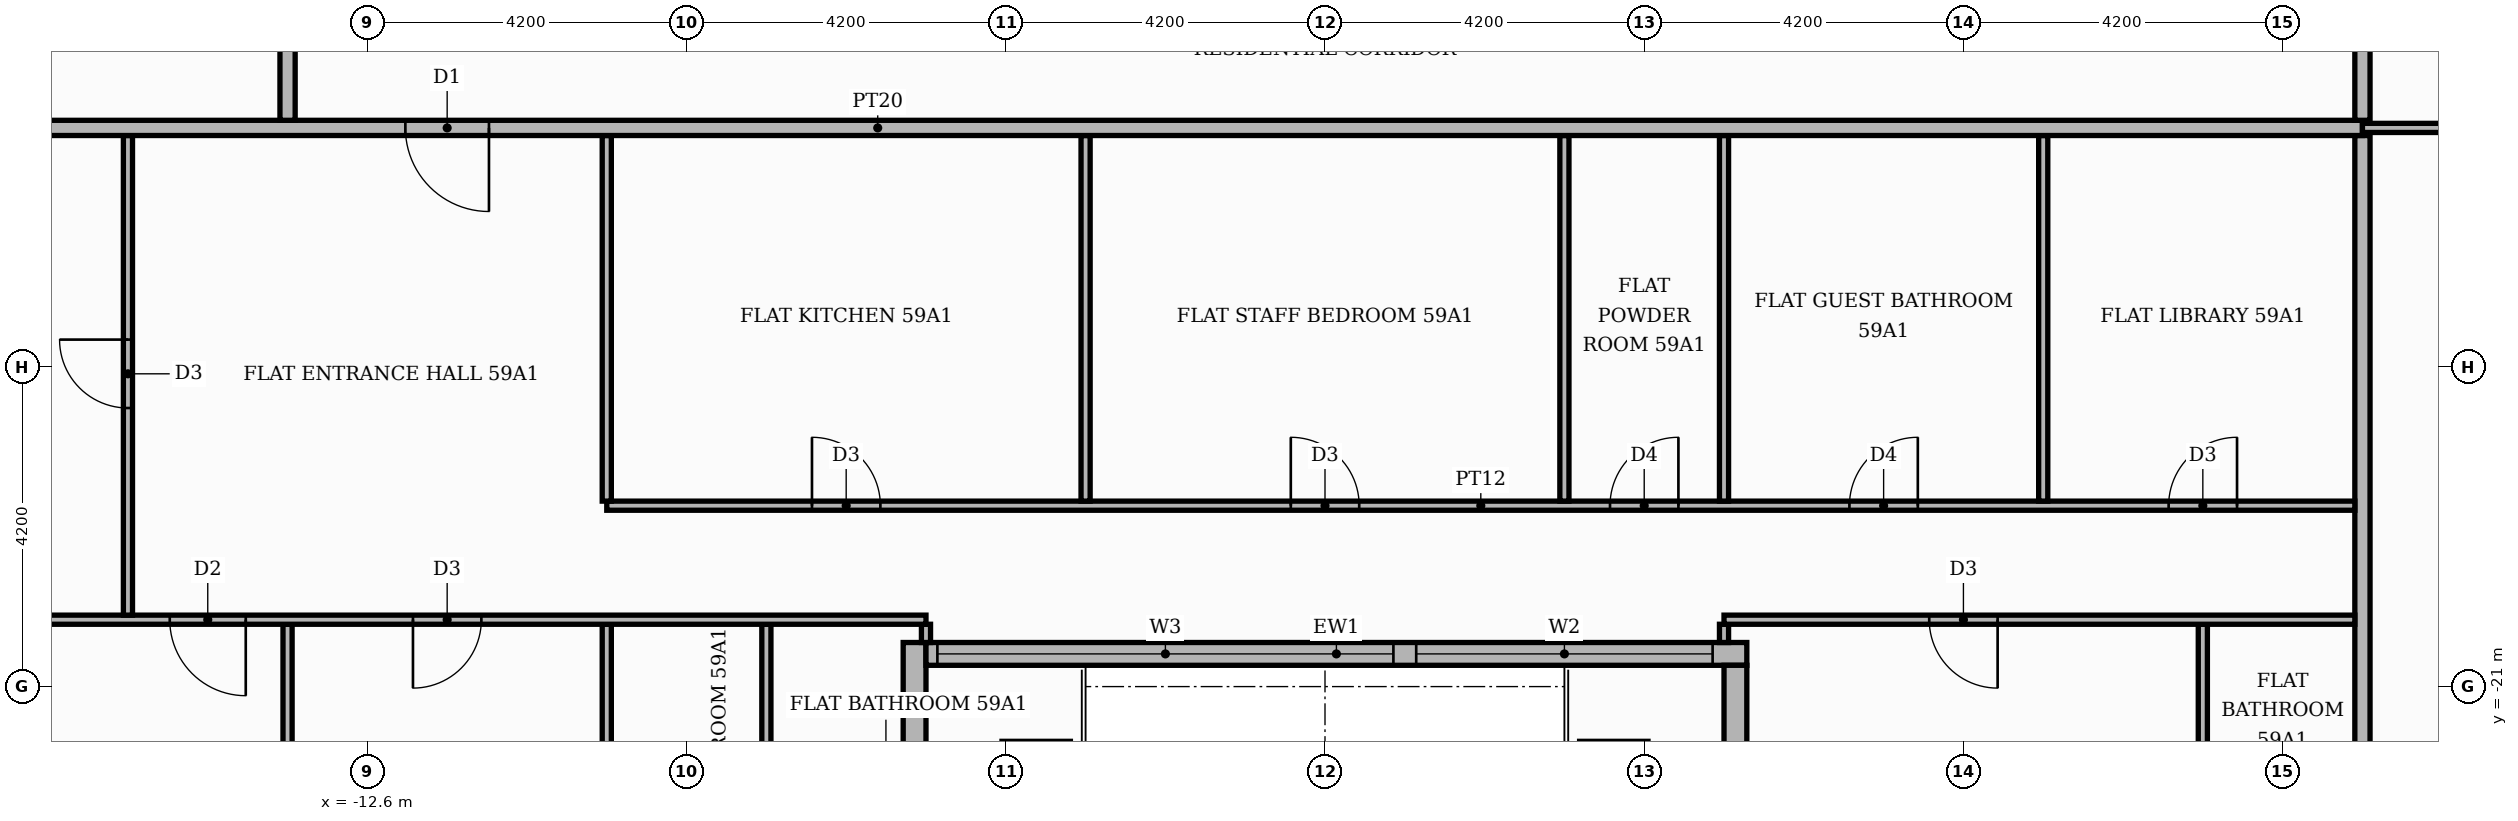
"""IFC4 building model, lengths in metres.
Left out: names, types, materials, properties, quantities, classifications, styles, units other than length and angle.
Written with IfcOpenShell. Run it as: python <this file> out.ifc"""

import sys

from ifc_helpers import new_model, si_unit, direction, frame, frame_2d, origin, place, context, subcontext, project, spatial, rectangle, extrude, element, fill, save


model = new_model("IFC4")
c1 = context("Model", 3, precision=1e-05, world=origin(), true_north=direction((0.0, 1.0)))
c2 = subcontext(c1, "Body", "Model", "MODEL_VIEW")
j1 = project(units=[si_unit("LENGTHUNIT", "METRE"), si_unit("PLANEANGLEUNIT", "RADIAN")], contexts=[c1])
p1 = place(None, origin())
s1 = spatial("IfcSite", under=j1, at=p1, CompositionType="ELEMENT")
p2 = place(p1, origin())
s2 = spatial("IfcBuilding", under=s1, at=p2, CompositionType="ELEMENT")
p3 = place(p2, frame((0.0, 0.0, 248.4)))
s3 = spatial("IfcBuildingStorey", under=s2, at=p3, CompositionType="ELEMENT", Elevation=248.4)
p4 = place(p3, frame((-5.4, -25.42, 0.0), z_axis=(0.0, 0.0, 1.0), x_axis=(0.0, 1.0, 0.0)))
e1 = element("IfcWall", 1, at=p4, inside=s3, PredefinedType="STANDARD", context=c2, shape_type="SweptSolid", body=[
    extrude(rectangle(XDim=5.0, YDim=0.3, at=frame_2d((2.5, 0.0))), origin(), (0.0, 0.0, 1.0), 3.48),
])
p5 = place(p4, frame((1.42, 0.0, 0.0)))
e2 = element("IfcOpeningElement", 2, at=p5, cuts=e1, PredefinedType="OPENING", context=c2, shape_type="SweptSolid", body=[
    extrude(rectangle(XDim=1.8, YDim=2.4, at=frame_2d((0.9, 1.2))), frame((0.0, 0.16, 0.0), z_axis=(0.0, -1.0, 0.0), x_axis=(1.0, 0.0, 0.0)), (0.0, 0.0, 1.0), 0.32),
])
p6 = place(p3, frame((-5.25, -20.57, 0.0), z_axis=(0.0, 0.0, 1.0), x_axis=(1.0, 0.0, 0.0)))
e3 = element("IfcWall", 3, at=p6, inside=s3, PredefinedType="STANDARD", context=c2, shape_type="SweptSolid", body=[
    extrude(rectangle(XDim=10.8, YDim=0.3, at=frame_2d((5.4, 0.0))), origin(), (0.0, 0.0, 1.0), 3.48),
])
p7 = place(p6, frame((0.15, 0.0, 0.9)))
e4 = element("IfcOpeningElement", 4, at=p7, cuts=e3, PredefinedType="OPENING", context=c2, shape_type="SweptSolid", body=[
    extrude(rectangle(XDim=6.0, YDim=2.1, at=frame_2d((3.0, 1.05))), frame((0.0, 0.16, 0.0), z_axis=(0.0, -1.0, 0.0), x_axis=(1.0, 0.0, 0.0)), (0.0, 0.0, 1.0), 0.32),
])
p8 = place(p6, frame((6.45, 0.0, 0.9)))
e5 = element("IfcOpeningElement", 5, at=p8, cuts=e3, PredefinedType="OPENING", context=c2, shape_type="SweptSolid", body=[
    extrude(rectangle(XDim=3.9, YDim=2.1, at=frame_2d((1.95, 1.05))), frame((0.0, 0.16, 0.0), z_axis=(0.0, -1.0, 0.0), x_axis=(1.0, 0.0, 0.0)), (0.0, 0.0, 1.0), 0.32),
])
p9 = place(p3, frame((5.4, -20.72, 0.0), z_axis=(0.0, 0.0, 1.0), x_axis=(0.0, -1.0, 0.0)))
e6 = element("IfcWall", 6, at=p9, inside=s3, PredefinedType="STANDARD", context=c2, shape_type="SweptSolid", body=[
    extrude(rectangle(XDim=5.0, YDim=0.3, at=frame_2d((2.5, 0.0))), origin(), (0.0, 0.0, 1.0), 3.48),
])
p10 = place(p9, frame((1.48, 0.0, 0.0)))
e7 = element("IfcOpeningElement", 7, at=p10, cuts=e6, PredefinedType="OPENING", context=c2, shape_type="SweptSolid", body=[
    extrude(rectangle(XDim=1.8, YDim=2.4, at=frame_2d((0.9, 1.2))), frame((0.0, 0.16, 0.0), z_axis=(0.0, -1.0, 0.0), x_axis=(1.0, 0.0, 0.0)), (0.0, 0.0, 1.0), 0.32),
])
p11 = place(p3, frame((-13.65, -25.42, 0.0), z_axis=(0.0, 0.0, 1.0), x_axis=(0.0, 1.0, 0.0)))
e8 = element("IfcWall", 8, at=p11, inside=s3, PredefinedType="PARTITIONING", context=c2, shape_type="SweptSolid", body=[
    extrude(rectangle(XDim=5.24, YDim=0.12, at=frame_2d((2.62, 0.0))), origin(), (0.0, 0.0, 1.0), 3.48),
])
p12 = place(p3, frame((-9.45, -25.42, 0.0), z_axis=(0.0, 0.0, 1.0), x_axis=(0.0, 1.0, 0.0)))
e9 = element("IfcWall", 9, at=p12, inside=s3, PredefinedType="PARTITIONING", context=c2, shape_type="SweptSolid", body=[
    extrude(rectangle(XDim=5.24, YDim=0.12, at=frame_2d((2.62, 0.0))), origin(), (0.0, 0.0, 1.0), 3.48),
])
p13 = place(p12, frame((2.05, 0.0, 0.0)))
e10 = element("IfcOpeningElement", 10, at=p13, cuts=e9, PredefinedType="OPENING", context=c2, shape_type="SweptSolid", body=[
    extrude(rectangle(XDim=0.9, YDim=2.1, at=frame_2d((0.45, 1.05))), frame((0.0, 0.07, 0.0), z_axis=(0.0, -1.0, 0.0), x_axis=(1.0, 0.0, 0.0)), (0.0, 0.0, 1.0), 0.14),
])
p14 = place(p3, frame((-7.35, -25.42, 0.0), z_axis=(0.0, 0.0, 1.0), x_axis=(0.0, 1.0, 0.0)))
e11 = element("IfcWall", 11, at=p14, inside=s3, PredefinedType="PARTITIONING", context=c2, shape_type="SweptSolid", body=[
    extrude(rectangle(XDim=5.24, YDim=0.12, at=frame_2d((2.62, 0.0))), origin(), (0.0, 0.0, 1.0), 3.48),
])
p15 = place(p14, frame((2.05, 0.0, 0.0)))
e12 = element("IfcOpeningElement", 12, at=p15, cuts=e11, PredefinedType="OPENING", context=c2, shape_type="SweptSolid", body=[
    extrude(rectangle(XDim=0.9, YDim=2.1, at=frame_2d((0.45, 1.05))), frame((0.0, 0.07, 0.0), z_axis=(0.0, -1.0, 0.0), x_axis=(1.0, 0.0, 0.0)), (0.0, 0.0, 1.0), 0.14),
])
p16 = place(p3, frame((11.55, -25.42, 0.0), z_axis=(0.0, 0.0, 1.0), x_axis=(0.0, 1.0, 0.0)))
e13 = element("IfcWall", 13, at=p16, inside=s3, PredefinedType="PARTITIONING", context=c2, shape_type="SweptSolid", body=[
    extrude(rectangle(XDim=5.24, YDim=0.12, at=frame_2d((2.62, 0.0))), origin(), (0.0, 0.0, 1.0), 3.48),
])
p17 = place(p16, frame((2.05, 0.0, 0.0)))
e14 = element("IfcOpeningElement", 14, at=p17, cuts=e13, PredefinedType="OPENING", context=c2, shape_type="SweptSolid", body=[
    extrude(rectangle(XDim=0.9, YDim=2.1, at=frame_2d((0.45, 1.05))), frame((0.0, 0.07, 0.0), z_axis=(0.0, -1.0, 0.0), x_axis=(1.0, 0.0, 0.0)), (0.0, 0.0, 1.0), 0.14),
])
p18 = place(p3, frame((13.65, -25.42, 0.0), z_axis=(0.0, 0.0, 1.0), x_axis=(0.0, 1.0, 0.0)))
e15 = element("IfcWall", 15, at=p18, inside=s3, PredefinedType="PARTITIONING", context=c2, shape_type="SweptSolid", body=[
    extrude(rectangle(XDim=11.67, YDim=0.2, at=frame_2d((5.835, 0.0))), origin(), (0.0, 0.0, 1.0), 3.48),
])
for number, where, z_axis, x_axis in (
    (16, (-5.25, -20.42, 0.0), (0.0, 0.0, 1.0), (0.0, 1.0, 0.0)),
    (17, (5.25, -20.42, 0.0), (0.0, 0.0, 1.0), (0.0, 1.0, 0.0)),
):
    element("IfcWall", number, at=place(p3, frame(where, z_axis=z_axis, x_axis=x_axis)), inside=s3, PredefinedType="PARTITIONING", context=c2, shape_type="SweptSolid", body=[
        extrude(rectangle(XDim=0.24, YDim=0.12, at=frame_2d((0.12, 0.0))), origin(), (0.0, 0.0, 1.0), 3.48),
    ])
p19 = place(p3, frame((-20.719, -20.12, 0.0), z_axis=(0.0, 0.0, 1.0), x_axis=(1.0, 0.0, 0.0)))
e18 = element("IfcWall", 18, at=p19, inside=s3, PredefinedType="PARTITIONING", context=c2, shape_type="SweptSolid", body=[
    extrude(rectangle(XDim=15.469, YDim=0.12, at=frame_2d((7.734, 0.0))), origin(), (0.0, 0.0, 1.0), 3.48),
])
p20 = place(p19, frame((5.519, 0.0, 0.0)))
e19 = element("IfcOpeningElement", 19, at=p20, cuts=e18, PredefinedType="OPENING", context=c2, shape_type="SweptSolid", body=[
    extrude(rectangle(XDim=1.0, YDim=2.1, at=frame_2d((0.5, 1.05))), frame((0.0, 0.07, 0.0), z_axis=(0.0, -1.0, 0.0), x_axis=(1.0, 0.0, 0.0)), (0.0, 0.0, 1.0), 0.14),
])
p21 = place(p19, frame((8.719, 0.0, 0.0)))
e20 = element("IfcOpeningElement", 20, at=p21, cuts=e18, PredefinedType="OPENING", context=c2, shape_type="SweptSolid", body=[
    extrude(rectangle(XDim=0.9, YDim=2.1, at=frame_2d((0.45, 1.05))), frame((0.0, 0.07, 0.0), z_axis=(0.0, -1.0, 0.0), x_axis=(1.0, 0.0, 0.0)), (0.0, 0.0, 1.0), 0.14),
])
p22 = place(p3, frame((5.25, -20.12, 0.0), z_axis=(0.0, 0.0, 1.0), x_axis=(1.0, 0.0, 0.0)))
e21 = element("IfcWall", 21, at=p22, inside=s3, PredefinedType="PARTITIONING", context=c2, shape_type="SweptSolid", body=[
    extrude(rectangle(XDim=8.3, YDim=0.12, at=frame_2d((4.15, 0.0))), origin(), (0.0, 0.0, 1.0), 3.48),
])
p23 = place(p22, frame((2.7, 0.0, 0.0)))
e22 = element("IfcOpeningElement", 22, at=p23, cuts=e21, PredefinedType="OPENING", context=c2, shape_type="SweptSolid", body=[
    extrude(rectangle(XDim=0.9, YDim=2.1, at=frame_2d((0.45, 1.05))), frame((0.0, 0.07, 0.0), z_axis=(0.0, -1.0, 0.0), x_axis=(1.0, 0.0, 0.0)), (0.0, 0.0, 1.0), 0.14),
])
p24 = place(p3, frame((-15.75, -20.06, 0.0), z_axis=(0.0, 0.0, 1.0), x_axis=(0.0, 1.0, 0.0)))
e23 = element("IfcWall", 23, at=p24, inside=s3, PredefinedType="PARTITIONING", context=c2, shape_type="SweptSolid", body=[
    extrude(rectangle(XDim=6.31, YDim=0.12, at=frame_2d((3.155, 0.0))), origin(), (0.0, 0.0, 1.0), 3.48),
])
p25 = place(p24, frame((2.725, 0.0, 0.0)))
e24 = element("IfcOpeningElement", 24, at=p25, cuts=e23, PredefinedType="OPENING", context=c2, shape_type="SweptSolid", body=[
    extrude(rectangle(XDim=0.9, YDim=2.1, at=frame_2d((0.45, 1.05))), frame((0.0, 0.07, 0.0), z_axis=(0.0, -1.0, 0.0), x_axis=(1.0, 0.0, 0.0)), (0.0, 0.0, 1.0), 0.14),
])
p26 = place(p3, frame((-9.45, -18.62, 0.0), z_axis=(0.0, 0.0, 1.0), x_axis=(1.0, 0.0, 0.0)))
e25 = element("IfcWall", 25, at=p26, inside=s3, PredefinedType="PARTITIONING", context=c2, shape_type="SweptSolid", body=[
    extrude(rectangle(XDim=23.0, YDim=0.12, at=frame_2d((11.5, 0.0))), origin(), (0.0, 0.0, 1.0), 3.48),
])
p27 = place(p26, frame((2.7, 0.0, 0.0)))
e26 = element("IfcOpeningElement", 26, at=p27, cuts=e25, PredefinedType="OPENING", context=c2, shape_type="SweptSolid", body=[
    extrude(rectangle(XDim=0.9, YDim=2.1, at=frame_2d((0.45, 1.05))), frame((0.0, 0.07, 0.0), z_axis=(0.0, -1.0, 0.0), x_axis=(1.0, 0.0, 0.0)), (0.0, 0.0, 1.0), 0.14),
])
p28 = place(p26, frame((9.0, 0.0, 0.0)))
e27 = element("IfcOpeningElement", 27, at=p28, cuts=e25, PredefinedType="OPENING", context=c2, shape_type="SweptSolid", body=[
    extrude(rectangle(XDim=0.9, YDim=2.1, at=frame_2d((0.45, 1.05))), frame((0.0, 0.07, 0.0), z_axis=(0.0, -1.0, 0.0), x_axis=(1.0, 0.0, 0.0)), (0.0, 0.0, 1.0), 0.14),
])
p29 = place(p26, frame((13.2, 0.0, 0.0)))
e28 = element("IfcOpeningElement", 28, at=p29, cuts=e25, PredefinedType="OPENING", context=c2, shape_type="SweptSolid", body=[
    extrude(rectangle(XDim=0.9, YDim=2.1, at=frame_2d((0.45, 1.05))), frame((0.0, 0.07, 0.0), z_axis=(0.0, -1.0, 0.0), x_axis=(1.0, 0.0, 0.0)), (0.0, 0.0, 1.0), 0.14),
])
p30 = place(p26, frame((16.35, 0.0, 0.0)))
e29 = element("IfcOpeningElement", 29, at=p30, cuts=e25, PredefinedType="OPENING", context=c2, shape_type="SweptSolid", body=[
    extrude(rectangle(XDim=0.9, YDim=2.1, at=frame_2d((0.45, 1.05))), frame((0.0, 0.07, 0.0), z_axis=(0.0, -1.0, 0.0), x_axis=(1.0, 0.0, 0.0)), (0.0, 0.0, 1.0), 0.14),
])
p31 = place(p26, frame((20.55, 0.0, 0.0)))
e30 = element("IfcOpeningElement", 30, at=p31, cuts=e25, PredefinedType="OPENING", context=c2, shape_type="SweptSolid", body=[
    extrude(rectangle(XDim=0.9, YDim=2.1, at=frame_2d((0.45, 1.05))), frame((0.0, 0.07, 0.0), z_axis=(0.0, -1.0, 0.0), x_axis=(1.0, 0.0, 0.0)), (0.0, 0.0, 1.0), 0.14),
])
for number, where, z_axis, x_axis in (
    (31, (-9.45, -18.56, 0.0), (0.0, 0.0, 1.0), (0.0, 1.0, 0.0)),
    (32, (-3.15, -18.56, 0.0), (0.0, 0.0, 1.0), (0.0, 1.0, 0.0)),
    (33, (3.15, -18.56, 0.0), (0.0, 0.0, 1.0), (0.0, 1.0, 0.0)),
    (34, (5.25, -18.56, 0.0), (0.0, 0.0, 1.0), (0.0, 1.0, 0.0)),
    (35, (9.45, -18.56, 0.0), (0.0, 0.0, 1.0), (0.0, 1.0, 0.0)),
):
    element("IfcWall", number, at=place(p3, frame(where, z_axis=z_axis, x_axis=x_axis)), inside=s3, PredefinedType="PARTITIONING", context=c2, shape_type="SweptSolid", body=[
        extrude(rectangle(XDim=4.81, YDim=0.12, at=frame_2d((2.405, 0.0))), origin(), (0.0, 0.0, 1.0), 3.48),
    ])
p32 = place(p3, frame((-25.42, -13.65, 0.0), z_axis=(0.0, 0.0, 1.0), x_axis=(1.0, 0.0, 0.0)))
e36 = element("IfcWall", 36, at=p32, inside=s3, PredefinedType="PARTITIONING", context=c2, shape_type="SweptSolid", body=[
    extrude(rectangle(XDim=39.07, YDim=0.2, at=frame_2d((19.535, 0.0))), origin(), (0.0, 0.0, 1.0), 3.48),
])
p33 = place(p32, frame((13.32, 0.0, 0.0)))
e37 = element("IfcOpeningElement", 37, at=p33, cuts=e36, PredefinedType="OPENING", context=c2, shape_type="SweptSolid", body=[
    extrude(rectangle(XDim=1.1, YDim=2.4, at=frame_2d((0.55, 1.2))), frame((0.0, 0.11, 0.0), z_axis=(0.0, -1.0, 0.0), x_axis=(1.0, 0.0, 0.0)), (0.0, 0.0, 1.0), 0.22),
])
p34 = place(p3, frame((13.65, -13.65, 0.0), z_axis=(0.0, 0.0, 1.0), x_axis=(1.0, 0.0, 0.0)))
e38 = element("IfcWall", 38, at=p34, inside=s3, PredefinedType="PARTITIONING", context=c2, shape_type="SweptSolid", body=[
    extrude(rectangle(XDim=7.07, YDim=0.12, at=frame_2d((3.535, 0.0))), origin(), (0.0, 0.0, 1.0), 3.48),
])
p35 = place(p34, frame((3.085, 0.0, 0.0)))
e39 = element("IfcOpeningElement", 39, at=p35, cuts=e38, PredefinedType="OPENING", context=c2, shape_type="SweptSolid", body=[
    extrude(rectangle(XDim=0.9, YDim=2.1, at=frame_2d((0.45, 1.05))), frame((0.0, 0.07, 0.0), z_axis=(0.0, -1.0, 0.0), x_axis=(1.0, 0.0, 0.0)), (0.0, 0.0, 1.0), 0.14),
])
for number, where, z_axis, x_axis in (
    (40, (-13.65, -13.55, 0.0), (0.0, 0.0, 1.0), (0.0, 1.0, 0.0)),
    (41, (13.65, -13.55, 0.0), (0.0, 0.0, 1.0), (0.0, 1.0, 0.0)),
):
    element("IfcWall", number, at=place(p3, frame(where, z_axis=z_axis, x_axis=x_axis)), inside=s3, PredefinedType="PARTITIONING", context=c2, shape_type="SweptSolid", body=[
        extrude(rectangle(XDim=2.45, YDim=0.2, at=frame_2d((1.225, 0.0))), origin(), (0.0, 0.0, 1.0), 3.48),
    ])
p36 = place(p7, origin())
e42 = element("IfcWindow", 42, at=p36, inside=s3, PartitioningType="SINGLE_PANEL", PredefinedType="WINDOW", context=c2, shape_type="SweptSolid", body=[
    extrude(rectangle(XDim=6.0, YDim=2.1, at=frame_2d((3.0, 1.05))), frame((0.0, 0.03, 0.0), z_axis=(0.0, -1.0, 0.0), x_axis=(1.0, 0.0, 0.0)), (0.0, 0.0, 1.0), 0.06),
])
fill(e4, e42)
p37 = place(p8, origin())
e43 = element("IfcWindow", 43, at=p37, inside=s3, PartitioningType="SINGLE_PANEL", PredefinedType="WINDOW", context=c2, shape_type="SweptSolid", body=[
    extrude(rectangle(XDim=3.9, YDim=2.1, at=frame_2d((1.95, 1.05))), frame((0.0, 0.03, 0.0), z_axis=(0.0, -1.0, 0.0), x_axis=(1.0, 0.0, 0.0)), (0.0, 0.0, 1.0), 0.06),
])
fill(e5, e43)
p38 = place(p33, frame((1.1, 0.0, 0.0), z_axis=(0.0, 0.0, 1.0), x_axis=(-1.0, 0.0, 0.0)))
e44 = element("IfcDoor", 44, at=p38, inside=s3, OperationType="SINGLE_SWING_RIGHT", PredefinedType="DOOR", context=c2, shape_type="SweptSolid", body=[
    extrude(rectangle(XDim=1.1, YDim=2.4, at=frame_2d((0.55, 1.2))), frame((0.0, 0.025, 0.0), z_axis=(0.0, -1.0, 0.0), x_axis=(1.0, 0.0, 0.0)), (0.0, 0.0, 1.0), 0.05),
])
fill(e37, e44)
p39 = place(p25, origin())
e45 = element("IfcDoor", 45, at=p39, inside=s3, OperationType="SINGLE_SWING_RIGHT", PredefinedType="DOOR", context=c2, shape_type="SweptSolid", body=[
    extrude(rectangle(XDim=0.9, YDim=2.1, at=frame_2d((0.45, 1.05))), frame((0.0, 0.025, 0.0), z_axis=(0.0, -1.0, 0.0), x_axis=(1.0, 0.0, 0.0)), (0.0, 0.0, 1.0), 0.05),
])
fill(e24, e45)
p40 = place(p27, origin())
e46 = element("IfcDoor", 46, at=p40, inside=s3, OperationType="SINGLE_SWING_LEFT", PredefinedType="DOOR", context=c2, shape_type="SweptSolid", body=[
    extrude(rectangle(XDim=0.9, YDim=2.1, at=frame_2d((0.45, 1.05))), frame((0.0, 0.025, 0.0), z_axis=(0.0, -1.0, 0.0), x_axis=(1.0, 0.0, 0.0)), (0.0, 0.0, 1.0), 0.05),
])
fill(e26, e46)
p41 = place(p28, origin())
e47 = element("IfcDoor", 47, at=p41, inside=s3, OperationType="SINGLE_SWING_LEFT", PredefinedType="DOOR", context=c2, shape_type="SweptSolid", body=[
    extrude(rectangle(XDim=0.9, YDim=2.1, at=frame_2d((0.45, 1.05))), frame((0.0, 0.025, 0.0), z_axis=(0.0, -1.0, 0.0), x_axis=(1.0, 0.0, 0.0)), (0.0, 0.0, 1.0), 0.05),
])
fill(e27, e47)
p42 = place(p29, origin())
e48 = element("IfcDoor", 48, at=p42, inside=s3, OperationType="SINGLE_SWING_RIGHT", PredefinedType="DOOR", context=c2, shape_type="SweptSolid", body=[
    extrude(rectangle(XDim=0.9, YDim=2.1, at=frame_2d((0.45, 1.05))), frame((0.0, 0.025, 0.0), z_axis=(0.0, -1.0, 0.0), x_axis=(1.0, 0.0, 0.0)), (0.0, 0.0, 1.0), 0.05),
])
fill(e28, e48)
p43 = place(p30, origin())
e49 = element("IfcDoor", 49, at=p43, inside=s3, OperationType="SINGLE_SWING_RIGHT", PredefinedType="DOOR", context=c2, shape_type="SweptSolid", body=[
    extrude(rectangle(XDim=0.9, YDim=2.1, at=frame_2d((0.45, 1.05))), frame((0.0, 0.025, 0.0), z_axis=(0.0, -1.0, 0.0), x_axis=(1.0, 0.0, 0.0)), (0.0, 0.0, 1.0), 0.05),
])
fill(e29, e49)
p44 = place(p31, origin())
e50 = element("IfcDoor", 50, at=p44, inside=s3, OperationType="SINGLE_SWING_RIGHT", PredefinedType="DOOR", context=c2, shape_type="SweptSolid", body=[
    extrude(rectangle(XDim=0.9, YDim=2.1, at=frame_2d((0.45, 1.05))), frame((0.0, 0.025, 0.0), z_axis=(0.0, -1.0, 0.0), x_axis=(1.0, 0.0, 0.0)), (0.0, 0.0, 1.0), 0.05),
])
fill(e30, e50)
p45 = place(p20, frame((1.0, 0.0, 0.0), z_axis=(0.0, 0.0, 1.0), x_axis=(-1.0, 0.0, 0.0)))
e51 = element("IfcDoor", 51, at=p45, inside=s3, OperationType="SINGLE_SWING_RIGHT", PredefinedType="DOOR", context=c2, shape_type="SweptSolid", body=[
    extrude(rectangle(XDim=1.0, YDim=2.1, at=frame_2d((0.5, 1.05))), frame((0.0, 0.025, 0.0), z_axis=(0.0, -1.0, 0.0), x_axis=(1.0, 0.0, 0.0)), (0.0, 0.0, 1.0), 0.05),
])
fill(e19, e51)
p46 = place(p21, frame((0.9, 0.0, 0.0), z_axis=(0.0, 0.0, 1.0), x_axis=(-1.0, 0.0, 0.0)))
e52 = element("IfcDoor", 52, at=p46, inside=s3, OperationType="SINGLE_SWING_LEFT", PredefinedType="DOOR", context=c2, shape_type="SweptSolid", body=[
    extrude(rectangle(XDim=0.9, YDim=2.1, at=frame_2d((0.45, 1.05))), frame((0.0, 0.025, 0.0), z_axis=(0.0, -1.0, 0.0), x_axis=(1.0, 0.0, 0.0)), (0.0, 0.0, 1.0), 0.05),
])
fill(e20, e52)
p47 = place(p23, frame((0.9, 0.0, 0.0), z_axis=(0.0, 0.0, 1.0), x_axis=(-1.0, 0.0, 0.0)))
e53 = element("IfcDoor", 53, at=p47, inside=s3, OperationType="SINGLE_SWING_RIGHT", PredefinedType="DOOR", context=c2, shape_type="SweptSolid", body=[
    extrude(rectangle(XDim=0.9, YDim=2.1, at=frame_2d((0.45, 1.05))), frame((0.0, 0.025, 0.0), z_axis=(0.0, -1.0, 0.0), x_axis=(1.0, 0.0, 0.0)), (0.0, 0.0, 1.0), 0.05),
])
fill(e22, e53)
save(model, sys.argv[1])
